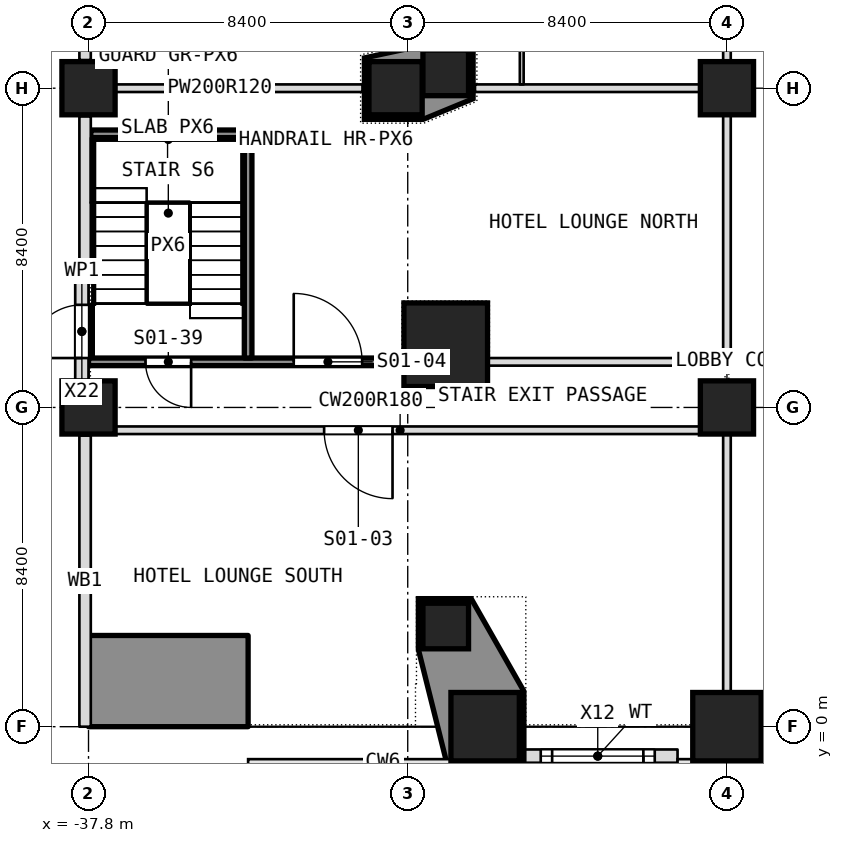
"""IFC4 building model, lengths in metres.
Left out: names, types, materials, properties, quantities, classifications, styles, units other than length and angle.
Written with IfcOpenShell. Run it as: python <this file> out.ifc"""

import sys

from ifc_helpers import new_model, si_unit, direction, frame, frame_2d, origin, origin_2d, place, context, subcontext, project, spatial, polyline, rectangle, outline, extrude, element, fill, save


model = new_model("IFC4")
c1 = context("Model", 3, precision=1e-05, world=origin(), true_north=direction((0.0, 1.0)))
c2 = subcontext(c1, "Body", "Model", "MODEL_VIEW")
j1 = project(units=[si_unit("LENGTHUNIT", "METRE"), si_unit("PLANEANGLEUNIT", "RADIAN")], contexts=[c1])
p1 = place(None, origin())
s1 = spatial("IfcSite", under=j1, at=p1, CompositionType="ELEMENT")
p2 = place(p1, origin())
s2 = spatial("IfcBuilding", under=s1, at=p2, CompositionType="ELEMENT")
p3 = place(p2, origin())
s3 = spatial("IfcBuildingStorey", under=s2, at=p3, CompositionType="ELEMENT", Elevation=0.0)
p4 = place(p3, frame((-21.0, 0.0, -0.3), z_axis=(0.0, 0.0, 1.0), x_axis=(1.0, 0.0, 0.0)))
e1 = element("IfcColumn", 1, at=p4, inside=s3, PredefinedType="COLUMN", context=c2, shape_type="SweptSolid", body=[
    extrude(rectangle(XDim=1.8, YDim=1.8, at=origin_2d()), origin(), (0.0, 0.0, 1.0), 8.3),
])
for number, where, z_axis, x_axis in (
    (2, (-37.8, 8.4, -0.3), (0.0, 0.0, 1.0), (1.0, 0.0, 0.0)),
    (3, (-21.0, 8.4, -0.3), (0.0, 0.0, 1.0), (1.0, 0.0, 0.0)),
    (4, (-37.8, 16.8, -0.3), (0.0, 0.0, 1.0), (1.0, 0.0, 0.0)),
    (5, (-29.72, 16.8, -0.3), (0.0, 0.0, 1.0), (1.0, 0.0, 0.0)),
    (6, (-21.0, 16.8, -0.3), (0.0, 0.0, 1.0), (1.0, 0.0, 0.0)),
):
    element("IfcColumn", number, at=place(p3, frame(where, z_axis=z_axis, x_axis=x_axis)), inside=s3, PredefinedType="COLUMN", context=c2, shape_type="SweptSolid", body=[
        extrude(rectangle(XDim=1.4, YDim=1.4, at=origin_2d()), origin(), (0.0, 0.0, 1.0), 8.3),
    ])
p5 = place(p3, frame((-27.363, 0.0, -0.3), z_axis=(0.0, 0.0, 1.0), x_axis=(1.0, 0.0, 0.0)))
e7 = element("IfcColumn", 7, at=p5, inside=s3, PredefinedType="COLUMN", context=c2, shape_type="SweptSolid", body=[
    extrude(rectangle(XDim=1.8, YDim=1.8, at=origin_2d()), origin(), (0.0, 0.0, 1.0), 8.3),
])
p6 = place(p3, frame((-28.4, 10.05, -0.3), z_axis=(0.0, 0.0, 1.0), x_axis=(1.0, 0.0, 0.0)))
e8 = element("IfcColumn", 8, at=p6, inside=s3, PredefinedType="COLUMN", context=c2, shape_type="SweptSolid", body=[
    extrude(rectangle(XDim=2.2, YDim=2.2, at=origin_2d()), origin(), (0.0, 0.0, 1.0), 8.3),
])
p7 = place(p3, frame((-37.8, 1.2, -0.3), z_axis=(0.0, 0.0, 1.0), x_axis=(1.0, 0.0, 0.0)))
e9 = element("IfcWall", 9, at=p7, inside=s3, PredefinedType="SOLIDWALL", context=c2, shape_type="SweptSolid", body=[
    extrude(rectangle(XDim=4.2, YDim=2.4, at=frame_2d((2.1, 0.0))), origin(), (0.0, 0.0, 1.0), 8.3),
])
for number, where, z_axis, x_axis in (
    (10, (-28.4, 2.649, -0.3), (0.0, 0.0, 1.0), (1.0, 0.0, 0.0)),
    (11, (-28.4, 17.203, -0.3), (0.0, 0.0, 1.0), (1.0, 0.0, 0.0)),
):
    element("IfcColumn", number, at=place(p3, frame(where, z_axis=z_axis, x_axis=x_axis)), inside=s3, PredefinedType="COLUMN", context=c2, shape_type="SweptSolid", body=[
        extrude(rectangle(XDim=1.2, YDim=1.2, at=origin_2d()), origin(), (0.0, 0.0, 1.0), 8.3),
    ])
p8 = place(p3, frame((-38.1, 7.8, 0.0), z_axis=(0.0, 0.0, 1.0), x_axis=(1.0, 0.0, 0.0)))
e12 = element("IfcWall", 12, at=p8, inside=s3, PredefinedType="PARTITIONING", context=c2, shape_type="SweptSolid", body=[
    extrude(rectangle(XDim=17.0, YDim=0.2, at=frame_2d((8.5, 0.0))), origin(), (0.0, 0.0, 1.0), 7.68),
])
p9 = place(p8, frame((6.5, 0.0, 0.0)))
e13 = element("IfcOpeningElement", 13, at=p9, cuts=e12, PredefinedType="OPENING", context=c2, shape_type="SweptSolid", body=[
    extrude(rectangle(XDim=1.8, YDim=2.1, at=frame_2d((0.9, 1.05))), frame((0.0, 0.1, 0.0), z_axis=(0.0, -1.0, 0.0), x_axis=(1.0, 0.0, 0.0)), (0.0, 0.0, 1.0), 0.2),
])
p10 = place(p3, frame((-37.8, 9.6, 0.0), z_axis=(0.0, 0.0, 1.0), x_axis=(1.0, 0.0, 0.0)))
e14 = element("IfcWall", 14, at=p10, inside=s3, PredefinedType="PARTITIONING", context=c2, shape_type="SweptSolid", body=[
    extrude(rectangle(XDim=8.3, YDim=0.2, at=frame_2d((4.15, 0.0))), origin(), (0.0, 0.0, 1.0), 7.68),
])
p11 = place(p10, frame((5.4, 0.0, 0.0)))
e15 = element("IfcOpeningElement", 15, at=p11, cuts=e14, PredefinedType="OPENING", context=c2, shape_type="SweptSolid", body=[
    extrude(rectangle(XDim=1.8, YDim=2.1, at=frame_2d((0.9, 1.05))), frame((0.0, 0.1, 0.0), z_axis=(0.0, -1.0, 0.0), x_axis=(1.0, 0.0, 0.0)), (0.0, 0.0, 1.0), 0.2),
])
p12 = place(p10, frame((1.5, 0.0, 0.0)))
e16 = element("IfcOpeningElement", 16, at=p12, cuts=e14, PredefinedType="OPENING", context=c2, shape_type="SweptSolid", body=[
    extrude(rectangle(XDim=1.2, YDim=2.1, at=frame_2d((0.6, 1.05))), frame((0.0, 0.1, 0.0), z_axis=(0.0, -1.0, 0.0), x_axis=(1.0, 0.0, 0.0)), (0.0, 0.0, 1.0), 0.2),
])
p13 = place(p3, frame((-27.3, 9.6, 0.0), z_axis=(0.0, 0.0, 1.0), x_axis=(1.0, 0.0, 0.0)))
e17 = element("IfcWall", 17, at=p13, inside=s3, PredefinedType="PARTITIONING", context=c2, shape_type="SweptSolid", body=[
    extrude(rectangle(XDim=6.2, YDim=0.2, at=frame_2d((3.1, 0.0))), origin(), (0.0, 0.0, 1.0), 7.68),
])
p14 = place(p3, frame((-37.74, 15.6, 0.0), z_axis=(0.0, 0.0, 1.0), x_axis=(1.0, 0.0, 0.0)))
e18 = element("IfcWall", 18, at=p14, inside=s3, PredefinedType="PARTITIONING", context=c2, shape_type="SweptSolid", body=[
    extrude(rectangle(XDim=4.24, YDim=0.2, at=frame_2d((2.12, 0.0))), origin(), (0.0, 0.0, 1.0), 7.68),
])
p15 = place(p3, frame((-38.1, 16.8, 0.0), z_axis=(0.0, 0.0, 1.0), x_axis=(1.0, 0.0, 0.0)))
e19 = element("IfcWall", 19, at=p15, inside=s3, PredefinedType="PARTITIONING", context=c2, shape_type="SweptSolid", body=[
    extrude(rectangle(XDim=7.51, YDim=0.2, at=frame_2d((3.755, 0.0))), origin(), (0.0, 0.0, 1.0), 7.68),
])
p16 = place(p3, frame((-27.63, 16.8, 0.0), z_axis=(0.0, 0.0, 1.0), x_axis=(1.0, 0.0, 0.0)))
e20 = element("IfcWall", 20, at=p16, inside=s3, PredefinedType="PARTITIONING", context=c2, shape_type="SweptSolid", body=[
    extrude(rectangle(XDim=6.53, YDim=0.2, at=frame_2d((3.265, 0.0))), origin(), (0.0, 0.0, 1.0), 7.68),
])
p17 = place(p3, frame((-21.0, -0.894, 0.0), z_axis=(0.0, 0.0, 1.0), x_axis=(0.0, 1.0, 0.0)))
e21 = element("IfcWall", 21, at=p17, inside=s3, PredefinedType="PARTITIONING", context=c2, shape_type="SweptSolid", body=[
    extrude(rectangle(XDim=8.794, YDim=0.2, at=frame_2d((4.397, 0.0))), origin(), (0.0, 0.0, 1.0), 7.68),
])
p18 = place(p3, frame((-21.0, 9.5, 0.0), z_axis=(0.0, 0.0, 1.0), x_axis=(0.0, 1.0, 0.0)))
e22 = element("IfcWall", 22, at=p18, inside=s3, PredefinedType="PARTITIONING", context=c2, shape_type="SweptSolid", body=[
    extrude(rectangle(XDim=22.788, YDim=0.2, at=frame_2d((11.394, 0.0))), origin(), (0.0, 0.0, 1.0), 7.68),
])
p19 = place(p18, frame((8.3, 0.0, 0.0)))
e23 = element("IfcOpeningElement", 23, at=p19, cuts=e22, PredefinedType="OPENING", context=c2, shape_type="SweptSolid", body=[
    extrude(rectangle(XDim=1.0, YDim=2.1, at=frame_2d((0.5, 1.05))), frame((0.0, 0.1, 0.0), z_axis=(0.0, -1.0, 0.0), x_axis=(1.0, 0.0, 0.0)), (0.0, 0.0, 1.0), 0.2),
])
p20 = place(p3, frame((-26.4, 16.9, 0.0), z_axis=(0.0, 0.0, 1.0), x_axis=(0.0, 1.0, 0.0)))
e24 = element("IfcWall", 24, at=p20, inside=s3, PredefinedType="PARTITIONING", context=c2, shape_type="SweptSolid", body=[
    extrude(rectangle(XDim=8.4, YDim=0.1, at=frame_2d((4.2, 0.0))), origin(), (0.0, 0.0, 1.0), 7.68),
])
p21 = place(p20, frame((3.7, 0.0, 0.0)))
e25 = element("IfcOpeningElement", 25, at=p21, cuts=e24, PredefinedType="OPENING", context=c2, shape_type="SweptSolid", body=[
    extrude(rectangle(XDim=1.0, YDim=2.1, at=frame_2d((0.5, 1.05))), frame((0.0, 0.05, 0.0), z_axis=(0.0, -1.0, 0.0), x_axis=(1.0, 0.0, 0.0)), (0.0, 0.0, 1.0), 0.1),
])
p22 = place(p3, frame((-33.6, 9.7, 0.0), z_axis=(0.0, 0.0, 1.0), x_axis=(0.0, 1.0, 0.0)))
e26 = element("IfcWall", 26, at=p22, inside=s3, PredefinedType="PARTITIONING", context=c2, shape_type="SweptSolid", body=[
    extrude(rectangle(XDim=5.8, YDim=0.2, at=frame_2d((2.9, 0.0))), origin(), (0.0, 0.0, 1.0), 7.68),
])
p23 = place(p3, frame((-26.5, -0.774, 0.0), z_axis=(0.0, 0.0, 1.0), x_axis=(1.0, 0.0, 0.0)))
e27 = element("IfcWall", 27, at=p23, inside=s3, PredefinedType="NOTDEFINED", context=c2, shape_type="SweptSolid", body=[
    extrude(rectangle(XDim=4.2, YDim=0.35, at=frame_2d((2.1, 0.0))), origin(), (0.0, 0.0, 1.0), 8.0),
])
p24 = place(p23, frame((0.9, 0.0, 0.0)))
e28 = element("IfcOpeningElement", 28, at=p24, cuts=e27, PredefinedType="OPENING", context=c2, shape_type="SweptSolid", body=[
    extrude(rectangle(XDim=2.4, YDim=2.4, at=frame_2d((1.2, 1.2))), frame((0.0, 0.175, 0.0), z_axis=(0.0, -1.0, 0.0), x_axis=(1.0, 0.0, 0.0)), (0.0, 0.0, 1.0), 0.35),
])
p25 = place(p23, frame((0.6, 0.0, 2.9)))
e29 = element("IfcOpeningElement", 29, at=p25, cuts=e27, PredefinedType="OPENING", context=c2, shape_type="SweptSolid", body=[
    extrude(rectangle(XDim=3.0, YDim=2.6, at=frame_2d((1.5, 1.3))), frame((0.0, 0.175, 0.0), z_axis=(0.0, -1.0, 0.0), x_axis=(1.0, 0.0, 0.0)), (0.0, 0.0, 1.0), 0.35),
])
p26 = place(p3, frame((-37.975, 11.7, 0.0), z_axis=(0.0, 0.0, 1.0), x_axis=(0.0, -1.0, 0.0)))
e30 = element("IfcWall", 30, at=p26, inside=s3, PredefinedType="NOTDEFINED", context=c2, shape_type="SweptSolid", body=[
    extrude(rectangle(XDim=2.6, YDim=0.35, at=frame_2d((1.3, 0.0))), origin(), (0.0, 0.0, 1.0), 8.0),
])
p27 = place(p26, frame((0.6, 0.0, 0.0)))
e31 = element("IfcOpeningElement", 31, at=p27, cuts=e30, PredefinedType="OPENING", context=c2, shape_type="SweptSolid", body=[
    extrude(rectangle(XDim=1.4, YDim=2.2, at=frame_2d((0.7, 1.1))), frame((0.0, 0.175, 0.0), z_axis=(0.0, -1.0, 0.0), x_axis=(1.0, 0.0, 0.0)), (0.0, 0.0, 1.0), 0.35),
])
p28 = place(p3, frame((-37.89, 18.9, 0.0), z_axis=(0.0, 0.0, 1.0), x_axis=(0.0, -1.0, 0.0)))
e32 = element("IfcWall", 32, at=p28, inside=s3, PredefinedType="NOTDEFINED", context=c2, shape_type="SweptSolid", body=[
    extrude(rectangle(XDim=1.36, YDim=0.3, at=frame_2d((0.68, 0.0))), origin(), (0.0, 0.0, 1.0), 6.78),
])
p29 = place(p3, frame((-37.89, 16.06, 0.0), z_axis=(0.0, 0.0, 1.0), x_axis=(0.0, -1.0, 0.0)))
e33 = element("IfcWall", 33, at=p29, inside=s3, PredefinedType="NOTDEFINED", context=c2, shape_type="SweptSolid", body=[
    extrude(rectangle(XDim=4.36, YDim=0.3, at=frame_2d((2.18, 0.0))), origin(), (0.0, 0.0, 1.0), 8.0),
])
p30 = place(p3, frame((-37.89, 7.66, 0.0), z_axis=(0.0, 0.0, 1.0), x_axis=(0.0, -1.0, 0.0)))
e34 = element("IfcWall", 34, at=p30, inside=s3, PredefinedType="NOTDEFINED", context=c2, shape_type="SweptSolid", body=[
    extrude(rectangle(XDim=7.66, YDim=0.3, at=frame_2d((3.83, 0.0))), origin(), (0.0, 0.0, 1.0), 6.78),
])
p31 = place(p3, origin())
e35 = element("IfcWall", 35, at=p31, inside=s3, PredefinedType="SOLIDWALL", context=c2, shape_type="SweptSolid", body=[
    extrude(outline(polyline([(-29.12, 3.369), (-27.73, 3.369), (-26.343, 0.932), (-26.343, -1.02), (-28.357, -1.02), (-29.12, 2.034), (-29.12, 3.369)]), holes=[polyline([(-26.463, -0.9), (-26.463, 0.9), (-28.263, 0.9), (-28.263, -0.9), (-26.463, -0.9)]), polyline([(-27.8, 2.049), (-27.8, 3.249), (-29.0, 3.249), (-29.0, 2.049), (-27.8, 2.049)])]), origin(), (0.0, 0.0, 1.0), 8.0),
])
p32 = place(p3, origin())
e36 = element("IfcWall", 36, at=p32, inside=s3, PredefinedType="SOLIDWALL", context=c2, shape_type="SweptSolid", body=[
    extrude(outline(polyline([(-30.54, 17.597), (-29.013, 17.923), (-27.68, 17.923), (-27.68, 16.523), (-28.996, 15.98), (-30.54, 15.98), (-30.54, 17.597)]), holes=[polyline([(-29.0, 16.603), (-27.8, 16.603), (-27.8, 17.803), (-29.0, 17.803), (-29.0, 16.603)]), polyline([(-30.42, 16.1), (-29.02, 16.1), (-29.02, 17.5), (-30.42, 17.5), (-30.42, 16.1)])]), origin(), (0.0, 0.0, 1.0), 8.0),
])
p33 = place(p9, origin())
e37 = element("IfcDoor", 37, at=p33, inside=s3, OperationType="DOUBLE_DOOR_SINGLE_SWING", PredefinedType="DOOR", context=c2, shape_type="SweptSolid", body=[
    extrude(rectangle(XDim=1.8, YDim=2.1, at=frame_2d((0.9, 1.05))), frame((0.0, 0.025, 0.0), z_axis=(0.0, -1.0, 0.0), x_axis=(1.0, 0.0, 0.0)), (0.0, 0.0, 1.0), 0.05),
])
fill(e13, e37)
p34 = place(p11, origin())
e38 = element("IfcDoor", 38, at=p34, inside=s3, OperationType="DOUBLE_DOOR_SINGLE_SWING", PredefinedType="DOOR", context=c2, shape_type="SweptSolid", body=[
    extrude(rectangle(XDim=1.8, YDim=2.1, at=frame_2d((0.9, 1.05))), frame((0.0, 0.025, 0.0), z_axis=(0.0, -1.0, 0.0), x_axis=(1.0, 0.0, 0.0)), (0.0, 0.0, 1.0), 0.05),
])
fill(e15, e38)
p35 = place(p12, origin())
e39 = element("IfcDoor", 39, at=p35, inside=s3, OperationType="SINGLE_SWING_RIGHT", PredefinedType="DOOR", context=c2, shape_type="SweptSolid", body=[
    extrude(rectangle(XDim=1.2, YDim=2.1, at=frame_2d((0.6, 1.05))), frame((0.0, 0.025, 0.0), z_axis=(0.0, -1.0, 0.0), x_axis=(1.0, 0.0, 0.0)), (0.0, 0.0, 1.0), 0.05),
])
fill(e16, e39)
p36 = place(p24, frame((2.4, 0.0, 0.0), z_axis=(0.0, 0.0, 1.0), x_axis=(-1.0, 0.0, 0.0)))
e40 = element("IfcDoor", 40, at=p36, inside=s3, OperationType="DOUBLE_DOOR_DOUBLE_SWING", PredefinedType="DOOR", context=c2, shape_type="SweptSolid", body=[
    extrude(rectangle(XDim=2.4, YDim=2.4, at=frame_2d((1.2, 1.2))), frame((0.0, 0.025, 0.0), z_axis=(0.0, -1.0, 0.0), x_axis=(1.0, 0.0, 0.0)), (0.0, 0.0, 1.0), 0.05),
])
fill(e28, e40)
p37 = place(p25, origin())
e41 = element("IfcWindow", 41, at=p37, inside=s3, PartitioningType="SINGLE_PANEL", PredefinedType="WINDOW", context=c2, shape_type="SweptSolid", body=[
    extrude(rectangle(XDim=3.0, YDim=2.6, at=frame_2d((1.5, 1.3))), frame((0.0, 0.03, 0.0), z_axis=(0.0, -1.0, 0.0), x_axis=(1.0, 0.0, 0.0)), (0.0, 0.0, 1.0), 0.06),
])
fill(e29, e41)
p38 = place(p27, frame((1.4, 0.0, 0.0), z_axis=(0.0, 0.0, 1.0), x_axis=(-1.0, 0.0, 0.0)))
e42 = element("IfcDoor", 42, at=p38, inside=s3, OperationType="SINGLE_SWING_LEFT", PredefinedType="DOOR", context=c2, shape_type="SweptSolid", body=[
    extrude(rectangle(XDim=1.4, YDim=2.2, at=frame_2d((0.7, 1.1))), frame((0.0, 0.025, 0.0), z_axis=(0.0, -1.0, 0.0), x_axis=(1.0, 0.0, 0.0)), (0.0, 0.0, 1.0), 0.05),
])
fill(e31, e42)
save(model, sys.argv[1])
